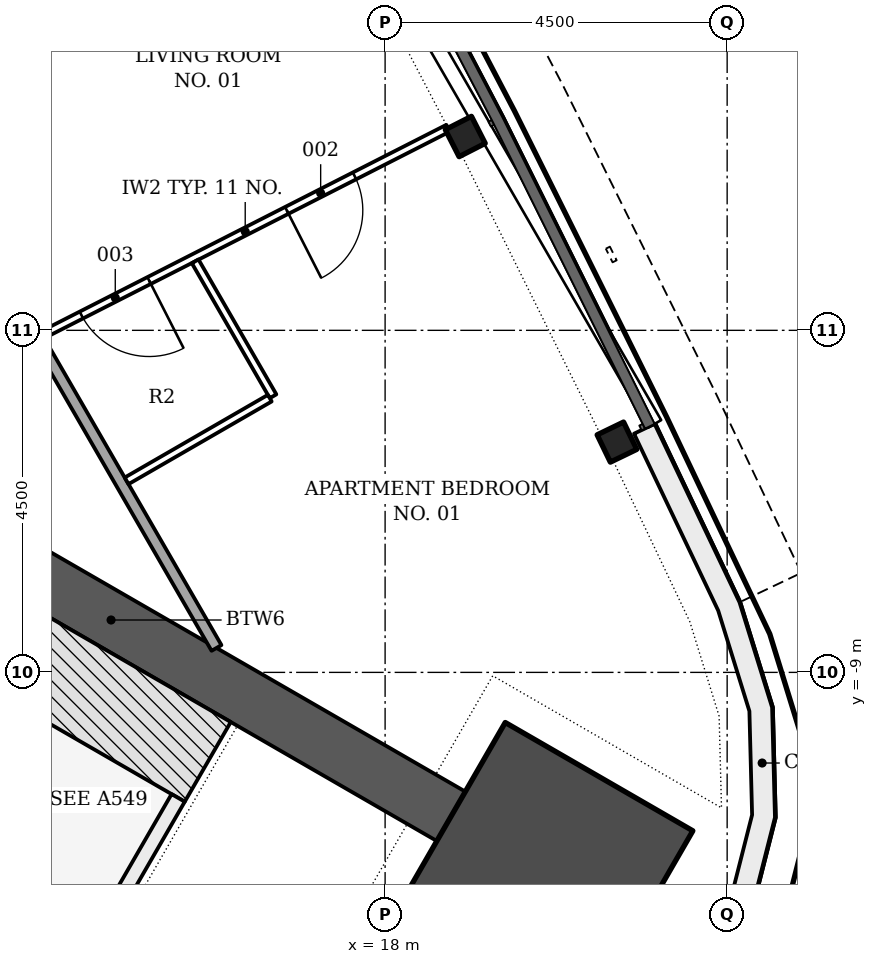
"""IFC4 building model, lengths in metres.
Left out: names, types, materials, properties, quantities, classifications, styles, units other than length and angle.
Written with IfcOpenShell. Run it as: python <this file> out.ifc"""

import sys

from ifc_helpers import new_model, si_unit, direction, frame, frame_2d, origin, origin_2d, place, context, subcontext, project, spatial, polyline, rectangle, i_section, outline, extrude, element, fill, save


model = new_model("IFC4")
c1 = context("Model", 3, precision=1e-05, world=origin(), true_north=direction((0.0, 1.0)))
c2 = subcontext(c1, "Body", "Model", "MODEL_VIEW")
j1 = project(units=[si_unit("LENGTHUNIT", "METRE"), si_unit("PLANEANGLEUNIT", "RADIAN")], contexts=[c1])
p1 = place(None, origin())
s1 = spatial("IfcSite", under=j1, at=p1, CompositionType="ELEMENT")
p2 = place(p1, origin())
s2 = spatial("IfcBuilding", under=s1, at=p2, CompositionType="ELEMENT")
p3 = place(p2, frame((0.0, 0.0, 158.1)))
s3 = spatial("IfcBuildingStorey", under=s2, at=p3, CompositionType="ELEMENT", Elevation=158.1)
p4 = place(p3, frame((9.922, -5.728, -0.2), z_axis=(0.0, 0.0, 1.0), x_axis=(0.866025410072, -0.499999989109, 0.0)))
e1 = element("IfcWall", 1, at=p4, inside=s3, PredefinedType="SHEAR", context=c2, shape_type="SweptSolid", body=[
    extrude(rectangle(XDim=10.331, YDim=0.75, at=frame_2d((5.165, 0.0))), origin(), (0.0, 0.0, 1.0), 3.6),
])
p5 = place(p3, frame((20.102, -11.606, -0.2), z_axis=(0.0, 0.0, 1.0), x_axis=(0.866025403784, -0.5, 0.0)))
e2 = element("IfcColumn", 2, at=p5, inside=s3, PredefinedType="COLUMN", context=c2, shape_type="SweptSolid", body=[
    extrude(rectangle(XDim=2.85, YDim=2.85, at=origin_2d()), origin(), (0.0, 0.0, 1.0), 3.6),
])
for number, where, z_axis, x_axis in (
    (3, (21.05, -5.97, -0.2), (0.0, 0.0, 1.0), (-0.435, 0.9, 0.0)),
    (4, (19.055, -1.95, -0.2), (0.0, 0.0, 1.0), (-0.454, 0.891, 0.0)),
):
    element("IfcColumn", number, at=place(p3, frame(where, z_axis=z_axis, x_axis=x_axis)), inside=s3, PredefinedType="COLUMN", context=c2, shape_type="SweptSolid", body=[
        extrude(i_section(OverallWidth=0.399, OverallDepth=0.386, WebThickness=0.021, FlangeThickness=0.033, FilletRadius=0.015, at=origin_2d()), origin(), (0.0, 0.0, 1.0), 3.6),
    ])
p6 = place(p3, origin())
e5 = element("IfcWall", 5, at=p6, inside=s3, PredefinedType="NOTDEFINED", context=c2, shape_type="SweptSolid", body=[
    extrude(outline(polyline([(15.736, -15.793), (18.327, -15.587), (19.739, -15.267), (21.011, -14.576), (22.049, -13.566), (22.773, -12.312), (23.129, -10.908), (23.092, -9.461), (22.663, -8.078), (21.545, -5.731), (21.275, -5.86), (22.382, -8.187), (22.793, -9.51), (22.828, -10.875), (22.492, -12.198), (21.81, -13.38), (20.832, -14.333), (19.632, -14.984), (18.281, -15.29), (15.712, -15.494), (15.736, -15.793)])), origin(), (0.0, 0.0, 1.0), 3.3),
])
p7 = place(p3, frame((9.431, -6.577, -0.2), z_axis=(0.0, 0.0, 1.0), x_axis=(0.866018442252, -0.500012057535, 0.0)))
e6 = element("IfcWall", 6, at=p7, inside=s3, PredefinedType="SHEAR", context=c2, shape_type="SweptSolid", body=[
    extrude(rectangle(XDim=7.2, YDim=1.211, at=frame_2d((3.6, 0.0))), origin(), (0.0, 0.0, 1.0), 3.6),
])
p8 = place(p3, frame((0.0, 0.0, -0.2)))
e7 = element("IfcWall", 7, at=p8, inside=s3, PredefinedType="SHEAR", context=c2, shape_type="SweptSolid", body=[
    extrude(outline(polyline([(12.104, -13.149), (14.289, -12.563), (15.364, -10.701), (15.191, -10.601), (14.157, -12.392), (12.132, -12.934), (12.204, -12.976), (12.204, -12.976), (12.204, -12.976), (12.204, -12.976), (12.204, -12.976), (12.204, -12.976), (12.204, -12.976), (12.204, -12.976), (12.204, -12.976), (12.204, -12.976), (12.204, -12.976), (12.204, -12.976), (12.204, -12.976), (12.204, -12.976), (12.204, -12.976), (12.204, -12.976), (12.204, -12.976), (12.104, -13.149)])), origin(), (0.0, 0.0, 1.0), 3.6),
])
p9 = place(p3, frame((15.782, -8.679, 0.0), z_axis=(0.0, 0.0, 1.0), x_axis=(-0.499998343211, 0.86602636033, 0.0)))
e8 = element("IfcWall", 8, at=p9, inside=s3, PredefinedType="PARTITIONING", context=c2, shape_type="SweptSolid", body=[
    extrude(rectangle(XDim=13.431, YDim=0.15, at=frame_2d((6.715, 0.0))), origin(), (0.0, 0.0, 1.0), 2.847),
])
p10 = place(p9, frame((6.396, 0.0, 0.0)))
e9 = element("IfcOpeningElement", 9, at=p10, cuts=e8, PredefinedType="OPENING", context=c2, shape_type="SweptSolid", body=[
    extrude(rectangle(XDim=1.0, YDim=2.1, at=frame_2d((0.5, 1.05))), frame((0.0, 0.085, 0.0), z_axis=(0.0, -1.0, 0.0), x_axis=(1.0, 0.0, 0.0)), (0.0, 0.0, 1.0), 0.17),
])
p11 = place(p9, frame((11.869, 0.0, 0.0)))
e10 = element("IfcOpeningElement", 10, at=p11, cuts=e8, PredefinedType="OPENING", context=c2, shape_type="SweptSolid", body=[
    extrude(rectangle(XDim=1.0, YDim=2.1, at=frame_2d((0.5, 1.05))), frame((0.0, 0.085, 0.0), z_axis=(0.0, -1.0, 0.0), x_axis=(1.0, 0.0, 0.0)), (0.0, 0.0, 1.0), 0.17),
])
p12 = place(p9, frame((9.691, 0.0, 0.0)))
e11 = element("IfcOpeningElement", 11, at=p12, cuts=e8, PredefinedType="OPENING", context=c2, shape_type="SweptSolid", body=[
    extrude(rectangle(XDim=1.0, YDim=2.1, at=frame_2d((0.5, 1.05))), frame((0.0, 0.085, 0.0), z_axis=(0.0, -1.0, 0.0), x_axis=(1.0, 0.0, 0.0)), (0.0, 0.0, 1.0), 0.17),
])
p13 = place(p3, frame((18.828, -1.841, 0.0), z_axis=(0.0, 0.0, 1.0), x_axis=(-0.891018968873, -0.453966074842, 0.0)))
e12 = element("IfcWall", 12, at=p13, inside=s3, PredefinedType="PARTITIONING", context=c2, shape_type="SweptSolid", body=[
    extrude(rectangle(XDim=5.99, YDim=0.1, at=frame_2d((2.995, 0.0))), origin(), (0.0, 0.0, 1.0), 3.4),
])
p14 = place(p13, frame((1.381, 0.0, 0.0)))
e13 = element("IfcOpeningElement", 13, at=p14, cuts=e12, PredefinedType="OPENING", context=c2, shape_type="SweptSolid", body=[
    extrude(rectangle(XDim=1.0, YDim=2.1, at=frame_2d((0.5, 1.05))), frame((0.0, 0.06, 0.0), z_axis=(0.0, -1.0, 0.0), x_axis=(1.0, 0.0, 0.0)), (0.0, 0.0, 1.0), 0.12),
])
p15 = place(p13, frame((4.414, 0.0, 0.0)))
e14 = element("IfcOpeningElement", 14, at=p15, cuts=e12, PredefinedType="OPENING", context=c2, shape_type="SweptSolid", body=[
    extrude(rectangle(XDim=1.0, YDim=2.1, at=frame_2d((0.5, 1.05))), frame((0.0, 0.06, 0.0), z_axis=(0.0, -1.0, 0.0), x_axis=(1.0, 0.0, 0.0)), (0.0, 0.0, 1.0), 0.12),
])
p16 = place(p3, frame((15.501, -3.592, 0.0), z_axis=(0.0, 0.0, 1.0), x_axis=(0.500097020274, -0.865969381856, 0.0)))
e15 = element("IfcWall", 15, at=p16, inside=s3, PredefinedType="PARTITIONING", context=c2, shape_type="SweptSolid", body=[
    extrude(rectangle(XDim=2.05, YDim=0.1, at=frame_2d((1.025, 0.0))), origin(), (0.0, 0.0, 1.0), 2.847),
])
p17 = place(p3, frame((16.483, -5.393, 0.0), z_axis=(0.0, 0.0, 1.0), x_axis=(-0.866037911478, -0.499978335414, 0.0)))
e16 = element("IfcWall", 16, at=p17, inside=s3, PredefinedType="PARTITIONING", context=c2, shape_type="SweptSolid", body=[
    extrude(rectangle(XDim=2.175, YDim=0.1, at=frame_2d((1.087, 0.0))), origin(), (0.0, 0.0, 1.0), 3.4),
])
p18 = place(p3, frame((16.747, 2.132, 0.0), z_axis=(0.0, 0.0, 1.0), x_axis=(-0.881303399969, -0.472550862028, 0.0)))
e17 = element("IfcWall", 17, at=p18, inside=s3, PredefinedType="PARTITIONING", context=c2, shape_type="SweptSolid", body=[
    extrude(rectangle(XDim=6.169, YDim=0.15, at=frame_2d((3.084, 0.0))), origin(), (0.0, 0.0, 1.0), 3.4),
])
p19 = place(p14, origin())
e18 = element("IfcDoor", 18, at=p19, inside=s3, OperationType="SINGLE_SWING_RIGHT", PredefinedType="DOOR", context=c2, shape_type="SweptSolid", body=[
    extrude(rectangle(XDim=1.0, YDim=2.1, at=frame_2d((0.5, 1.05))), frame((0.0, 0.025, 0.0), z_axis=(0.0, -1.0, 0.0), x_axis=(1.0, 0.0, 0.0)), (0.0, 0.0, 1.0), 0.05),
])
fill(e13, e18)
p20 = place(p15, origin())
e19 = element("IfcDoor", 19, at=p20, inside=s3, OperationType="SINGLE_SWING_LEFT", PredefinedType="DOOR", context=c2, shape_type="SweptSolid", body=[
    extrude(rectangle(XDim=1.0, YDim=2.1, at=frame_2d((0.5, 1.05))), frame((0.0, 0.025, 0.0), z_axis=(0.0, -1.0, 0.0), x_axis=(1.0, 0.0, 0.0)), (0.0, 0.0, 1.0), 0.05),
])
fill(e14, e19)
save(model, sys.argv[1])
